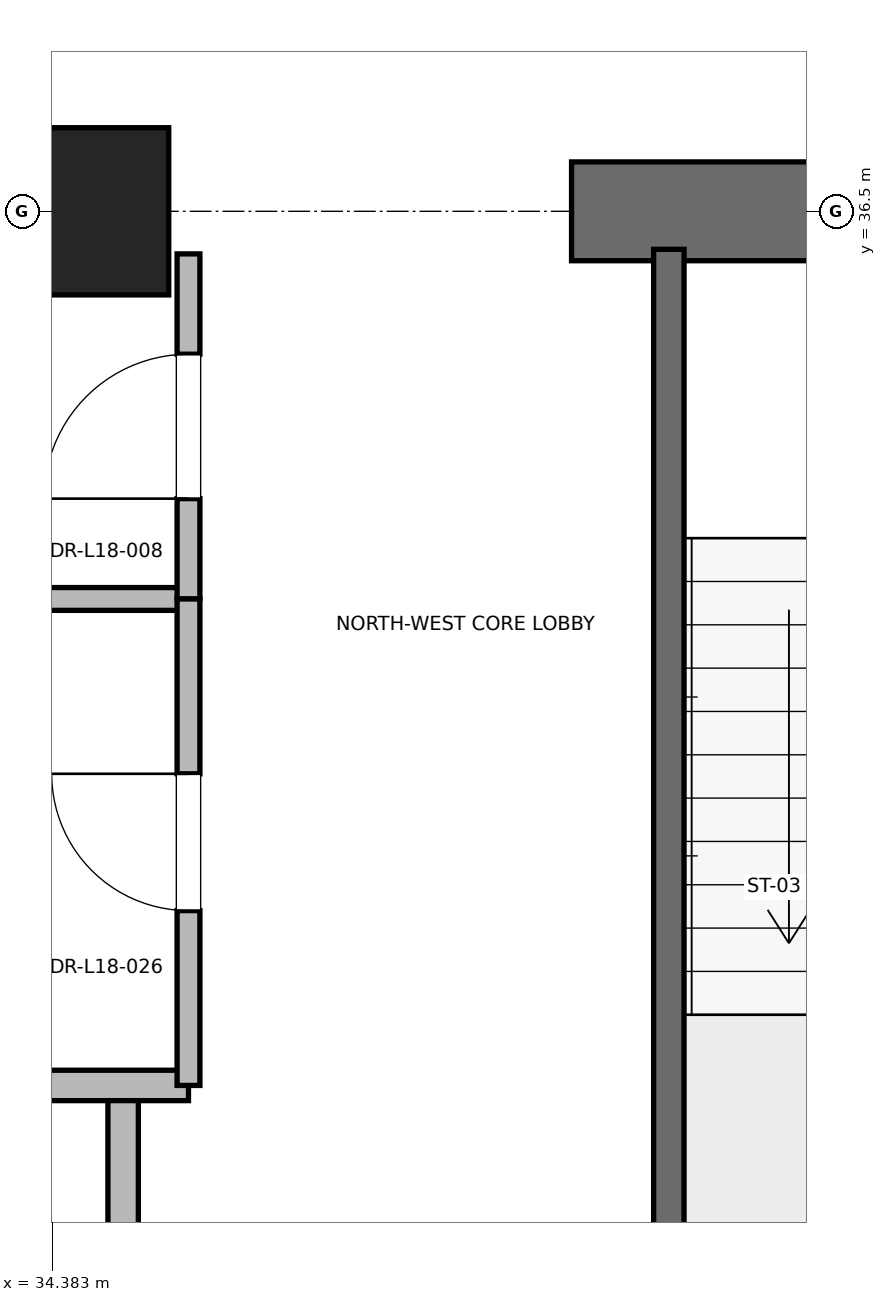
"""IFC4 building model, lengths in metres.
Left out: names, types, materials, properties, quantities, classifications, styles, units other than length and angle.
Written with IfcOpenShell. Run it as: python <this file> out.ifc"""

import sys

from ifc_helpers import new_model, si_unit, direction, frame, frame_2d, origin, origin_2d, place, context, subcontext, project, spatial, rectangle, extrude, element, fill, save


model = new_model("IFC4")
c1 = context("Model", 3, precision=1e-05, world=origin(), true_north=direction((0.0, 1.0)))
c2 = subcontext(c1, "Body", "Model", "MODEL_VIEW")
j1 = project(units=[si_unit("LENGTHUNIT", "METRE"), si_unit("PLANEANGLEUNIT", "RADIAN")], contexts=[c1])
p1 = place(None, origin())
s1 = spatial("IfcSite", under=j1, at=p1, CompositionType="ELEMENT")
p2 = place(p1, origin())
s2 = spatial("IfcBuilding", under=s1, at=p2, CompositionType="ELEMENT")
p3 = place(p2, frame((0.0, 0.0, 79.6)))
s3 = spatial("IfcBuildingStorey", under=s2, at=p3, CompositionType="ELEMENT", Elevation=79.6)
p4 = place(p3, frame((34.6, 36.5, 0.0), z_axis=(0.0, 0.0, 1.0), x_axis=(1.0, 0.0, 0.0)))
e1 = element("IfcColumn", 1, at=p4, inside=s3, PredefinedType="PILASTER", context=c2, shape_type="SweptSolid", body=[
    extrude(rectangle(XDim=1.1, YDim=1.1, at=origin_2d()), origin(), (0.0, 0.0, 1.0), 4.0),
])
p5 = place(p3, frame((29.0, 36.5, 0.0), z_axis=(0.0, 0.0, 1.0), x_axis=(1.0, 0.0, 0.0)))
e2 = element("IfcWall", 2, at=p5, inside=s3, PredefinedType="SHEAR", context=c2, shape_type="SweptSolid", body=[
    extrude(rectangle(XDim=5.8, YDim=0.65, at=frame_2d((2.9, 0.0))), origin(), (0.0, 0.0, 1.0), 3.76),
])
p6 = place(p3, frame((37.8, 36.5, 0.0), z_axis=(0.0, 0.0, 1.0), x_axis=(1.0, 0.0, 0.0)))
e3 = element("IfcWall", 3, at=p6, inside=s3, PredefinedType="SHEAR", context=c2, shape_type="SweptSolid", body=[
    extrude(rectangle(XDim=4.4, YDim=0.65, at=frame_2d((2.2, 0.0))), origin(), (0.0, 0.0, 1.0), 3.76),
])
p7 = place(p6, frame((1.65, 0.0, 0.0)))
e4 = element("IfcOpeningElement", 4, at=p7, cuts=e3, PredefinedType="OPENING", context=c2, shape_type="SweptSolid", body=[
    extrude(rectangle(XDim=1.1, YDim=2.15, at=frame_2d((0.55, 1.075))), frame((0.0, 0.325, 0.0), z_axis=(0.0, -1.0, 0.0), x_axis=(1.0, 0.0, 0.0)), (0.0, 0.0, 1.0), 0.65),
])
p8 = place(p3, frame((38.44, 27.38, 0.0), z_axis=(0.0, 0.0, 1.0), x_axis=(0.0, 1.0, 0.0)))
e5 = element("IfcWall", 5, at=p8, inside=s3, PredefinedType="SOLIDWALL", context=c2, shape_type="SweptSolid", body=[
    extrude(rectangle(XDim=8.87, YDim=0.2, at=frame_2d((4.435, 0.0))), origin(), (0.0, 0.0, 1.0), 3.76),
])
p9 = place(p3, frame((34.85, 27.38, 0.0), z_axis=(0.0, 0.0, 1.0), x_axis=(0.0, 1.0, 0.0)))
e6 = element("IfcWall", 6, at=p9, inside=s3, PredefinedType="PARTITIONING", context=c2, shape_type="SweptSolid", body=[
    extrude(rectangle(XDim=3.37, YDim=0.2, at=frame_2d((1.685, 0.0))), origin(), (0.0, 0.0, 1.0), 3.76),
])
p10 = place(p9, frame((1.11, 0.0, 0.0)))
e7 = element("IfcOpeningElement", 7, at=p10, cuts=e6, PredefinedType="OPENING", context=c2, shape_type="SweptSolid", body=[
    extrude(rectangle(XDim=1.15, YDim=2.2, at=frame_2d((0.575, 1.1))), frame((0.0, 0.1, 0.0), z_axis=(0.0, -1.0, 0.0), x_axis=(1.0, 0.0, 0.0)), (0.0, 0.0, 1.0), 0.2),
])
p11 = place(p3, frame((32.15, 30.75, 0.0), z_axis=(0.0, 0.0, 1.0), x_axis=(1.0, 0.0, 0.0)))
e8 = element("IfcWall", 8, at=p11, inside=s3, PredefinedType="PARTITIONING", context=c2, shape_type="SweptSolid", body=[
    extrude(rectangle(XDim=3.13, YDim=0.2, at=frame_2d((1.565, 0.0))), origin(), (0.0, 0.0, 1.0), 3.76),
])
p12 = place(p3, frame((32.15, 33.95, 0.0), z_axis=(0.0, 0.0, 1.0), x_axis=(1.0, 0.0, 0.0)))
e9 = element("IfcWall", 9, at=p12, inside=s3, PredefinedType="PARTITIONING", context=c2, shape_type="SweptSolid", body=[
    extrude(rectangle(XDim=3.13, YDim=0.15, at=frame_2d((1.565, 0.0))), origin(), (0.0, 0.0, 1.0), 2.85),
])
p13 = place(p3, frame((35.28, 33.95, 0.0), z_axis=(0.0, 0.0, 1.0), x_axis=(0.0, 1.0, 0.0)))
e10 = element("IfcWall", 10, at=p13, inside=s3, PredefinedType="PARTITIONING", context=c2, shape_type="SweptSolid", body=[
    extrude(rectangle(XDim=2.27, YDim=0.15, at=frame_2d((1.135, 0.0))), origin(), (0.0, 0.0, 1.0), 2.54),
])
p14 = place(p13, frame((0.66, 0.0, 0.0)))
e11 = element("IfcOpeningElement", 11, at=p14, cuts=e10, PredefinedType="OPENING", context=c2, shape_type="SweptSolid", body=[
    extrude(rectangle(XDim=0.95, YDim=2.15, at=frame_2d((0.475, 1.075))), frame((0.0, 0.075, 0.0), z_axis=(0.0, -1.0, 0.0), x_axis=(1.0, 0.0, 0.0)), (0.0, 0.0, 1.0), 0.15),
])
p15 = place(p3, frame((35.28, 30.75, 0.0), z_axis=(0.0, 0.0, 1.0), x_axis=(0.0, 1.0, 0.0)))
e12 = element("IfcWall", 12, at=p15, inside=s3, PredefinedType="PARTITIONING", context=c2, shape_type="SweptSolid", body=[
    extrude(rectangle(XDim=3.2, YDim=0.15, at=frame_2d((1.6, 0.0))), origin(), (0.0, 0.0, 1.0), 2.85),
])
p16 = place(p15, frame((1.15, 0.0, 0.0)))
e13 = element("IfcOpeningElement", 13, at=p16, cuts=e12, PredefinedType="OPENING", context=c2, shape_type="SweptSolid", body=[
    extrude(rectangle(XDim=0.9, YDim=2.1, at=frame_2d((0.45, 1.05))), frame((0.0, 0.075, 0.0), z_axis=(0.0, -1.0, 0.0), x_axis=(1.0, 0.0, 0.0)), (0.0, 0.0, 1.0), 0.15),
])
p17 = place(p14, origin())
e14 = element("IfcDoor", 14, at=p17, inside=s3, OperationType="SINGLE_SWING_LEFT", PredefinedType="DOOR", context=c2, shape_type="SweptSolid", body=[
    extrude(rectangle(XDim=0.95, YDim=2.15, at=frame_2d((0.475, 1.075))), frame((0.0, 0.025, 0.0), z_axis=(0.0, -1.0, 0.0), x_axis=(1.0, 0.0, 0.0)), (0.0, 0.0, 1.0), 0.05),
])
fill(e11, e14)
p18 = place(p16, origin())
e15 = element("IfcDoor", 15, at=p18, inside=s3, OperationType="SINGLE_SWING_RIGHT", PredefinedType="DOOR", context=c2, shape_type="SweptSolid", body=[
    extrude(rectangle(XDim=0.9, YDim=2.1, at=frame_2d((0.45, 1.05))), frame((0.0, 0.025, 0.0), z_axis=(0.0, -1.0, 0.0), x_axis=(1.0, 0.0, 0.0)), (0.0, 0.0, 1.0), 0.05),
])
fill(e13, e15)
save(model, sys.argv[1])
